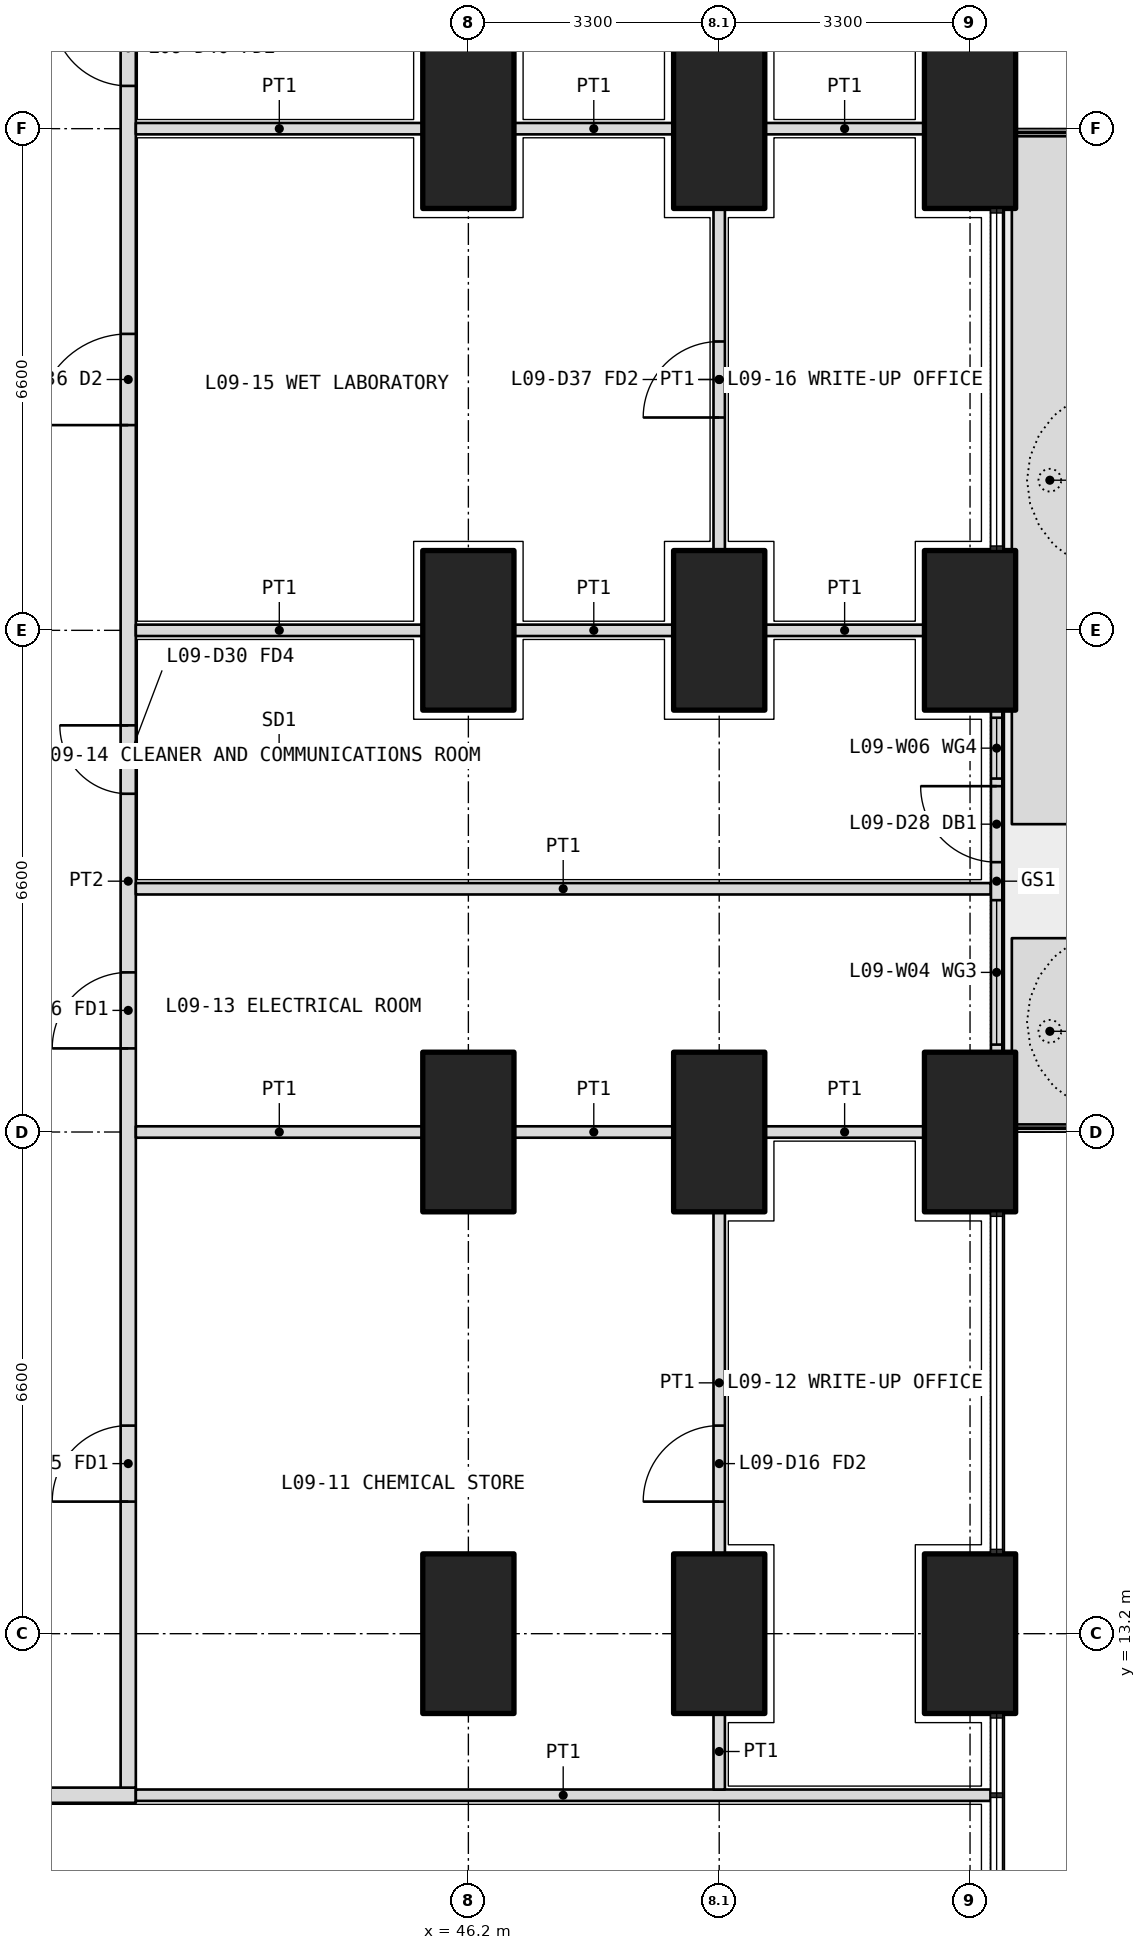
"""IFC4 building model, lengths in metres.
Left out: names, types, materials, properties, quantities, classifications, styles, units other than length and angle.
Written with IfcOpenShell. Run it as: python <this file> out.ifc"""

import sys

from ifc_helpers import new_model, si_unit, direction, frame, frame_2d, origin, origin_2d, place, context, subcontext, project, spatial, polyline, rectangle, outline, extrude, element, fill, save


model = new_model("IFC4")
c1 = context("Model", 3, precision=1e-05, world=origin(), true_north=direction((0.0, 1.0)))
c2 = subcontext(c1, "Body", "Model", "MODEL_VIEW")
j1 = project(units=[si_unit("LENGTHUNIT", "METRE"), si_unit("PLANEANGLEUNIT", "RADIAN")], contexts=[c1])
p1 = place(None, origin())
s1 = spatial("IfcSite", under=j1, at=p1, CompositionType="ELEMENT")
p2 = place(p1, origin())
s2 = spatial("IfcBuilding", under=s1, at=p2, CompositionType="ELEMENT")
p3 = place(p2, frame((0.0, 0.0, 42.3)))
s3 = spatial("IfcBuildingStorey", under=s2, at=p3, CompositionType="ELEMENT", Elevation=42.3)
for number, where, z_axis, x_axis in (
    (1, (52.8, 13.2, 0.0), (0.0, 0.0, 1.0), (0.0, 1.0, 0.0)),
    (2, (52.8, 19.8, 0.0), (0.0, 0.0, 1.0), (0.0, 1.0, 0.0)),
    (3, (52.8, 26.4, 0.0), (0.0, 0.0, 1.0), (0.0, 1.0, 0.0)),
    (4, (52.8, 33.0, 0.0), (0.0, 0.0, 1.0), (0.0, 1.0, 0.0)),
    (5, (49.5, 13.2, 0.0), (0.0, 0.0, 1.0), (0.0, 1.0, 0.0)),
    (6, (49.5, 19.8, 0.0), (0.0, 0.0, 1.0), (0.0, 1.0, 0.0)),
    (7, (49.5, 26.4, 0.0), (0.0, 0.0, 1.0), (0.0, 1.0, 0.0)),
    (8, (49.5, 33.0, 0.0), (0.0, 0.0, 1.0), (0.0, 1.0, 0.0)),
    (9, (46.2, 13.2, 0.0), (0.0, 0.0, 1.0), (0.0, 1.0, 0.0)),
    (10, (46.2, 19.8, 0.0), (0.0, 0.0, 1.0), (0.0, 1.0, 0.0)),
    (11, (46.2, 26.4, 0.0), (0.0, 0.0, 1.0), (0.0, 1.0, 0.0)),
    (12, (46.2, 33.0, 0.0), (0.0, 0.0, 1.0), (0.0, 1.0, 0.0)),
):
    element("IfcColumn", number, at=place(p3, frame(where, z_axis=z_axis, x_axis=x_axis)), inside=s3, PredefinedType="COLUMN", context=c2, shape_type="SweptSolid", body=[
        extrude(rectangle(XDim=2.1, YDim=1.2, at=origin_2d()), origin(), (0.0, 0.0, 1.0), 4.2),
    ])
p4 = place(p3, origin())
e13 = element("IfcWall", 13, at=p4, inside=s3, PredefinedType="USERDEFINED", context=c2, shape_type="SweptSolid", body=[
    extrude(outline(polyline([(53.35, 19.9), (54.35, 19.9), (54.35, 22.35), (53.35, 22.35), (53.35, 19.9)]), holes=[polyline([(53.5, 20.05), (54.2, 20.05), (54.2, 22.2), (53.5, 22.2), (53.5, 20.05)])]), origin(), (0.0, 0.0, 1.0), 1.05),
])
p5 = place(p3, origin())
e14 = element("IfcWall", 14, at=p5, inside=s3, PredefinedType="USERDEFINED", context=c2, shape_type="SweptSolid", body=[
    extrude(outline(polyline([(53.35, 23.85), (54.35, 23.85), (54.35, 32.9), (53.35, 32.9), (53.35, 23.85)]), holes=[polyline([(53.5, 24.0), (54.2, 24.0), (54.2, 32.75), (53.5, 32.75), (53.5, 24.0)])]), origin(), (0.0, 0.0, 1.0), 1.05),
])
p6 = place(p3, frame((53.15, 20.85, 0.0), z_axis=(0.0, 0.0, 1.0), x_axis=(0.0, 1.0, 0.0)))
e15 = element("IfcWall", 15, at=p6, inside=s3, PredefinedType="SOLIDWALL", context=c2, shape_type="SweptSolid", body=[
    extrude(rectangle(XDim=4.5, YDim=0.15, at=frame_2d((2.25, 0.0))), origin(), (0.0, 0.0, 1.0), 2.7),
])
p7 = place(p6, frame((2.5, 0.0, 0.0)))
e16 = element("IfcOpeningElement", 16, at=p7, cuts=e15, PredefinedType="OPENING", context=c2, shape_type="SweptSolid", body=[
    extrude(rectangle(XDim=1.0, YDim=2.4, at=frame_2d((0.5, 1.2))), frame((0.0, 0.085, 0.0), z_axis=(0.0, -1.0, 0.0), x_axis=(1.0, 0.0, 0.0)), (0.0, 0.0, 1.0), 0.17),
])
p8 = place(p6, frame((0.1, 0.0, 0.1)))
e17 = element("IfcOpeningElement", 17, at=p8, cuts=e15, PredefinedType="OPENING", context=c2, shape_type="SweptSolid", body=[
    extrude(rectangle(XDim=1.9, YDim=2.3, at=frame_2d((0.95, 1.15))), frame((0.0, 0.085, 0.0), z_axis=(0.0, -1.0, 0.0), x_axis=(1.0, 0.0, 0.0)), (0.0, 0.0, 1.0), 0.17),
])
p9 = place(p6, frame((3.6, 0.0, 0.1)))
e18 = element("IfcOpeningElement", 18, at=p9, cuts=e15, PredefinedType="OPENING", context=c2, shape_type="SweptSolid", body=[
    extrude(rectangle(XDim=0.8, YDim=2.3, at=frame_2d((0.4, 1.15))), frame((0.0, 0.085, 0.0), z_axis=(0.0, -1.0, 0.0), x_axis=(1.0, 0.0, 0.0)), (0.0, 0.0, 1.0), 0.17),
])
p10 = place(p3, frame((10.975, 11.075, 0.0), z_axis=(0.0, 0.0, 1.0), x_axis=(1.0, 0.0, 0.0)))
e19 = element("IfcWall", 19, at=p10, inside=s3, PredefinedType="PARTITIONING", context=c2, shape_type="SweptSolid", body=[
    extrude(rectangle(XDim=30.85, YDim=0.2, at=frame_2d((15.425, 0.0))), origin(), (0.0, 0.0, 1.0), 2.85),
])
p11 = place(p10, frame((2.312, 0.0, 0.0)))
e20 = element("IfcOpeningElement", 20, at=p11, cuts=e19, PredefinedType="OPENING", context=c2, shape_type="SweptSolid", body=[
    extrude(rectangle(XDim=1.0, YDim=2.1, at=frame_2d((0.5, 1.05))), frame((0.0, 0.11, 0.0), z_axis=(0.0, -1.0, 0.0), x_axis=(1.0, 0.0, 0.0)), (0.0, 0.0, 1.0), 0.22),
])
p12 = place(p10, frame((6.575, 0.0, 0.0)))
e21 = element("IfcOpeningElement", 21, at=p12, cuts=e19, PredefinedType="OPENING", context=c2, shape_type="SweptSolid", body=[
    extrude(rectangle(XDim=1.2, YDim=2.1, at=frame_2d((0.6, 1.05))), frame((0.0, 0.11, 0.0), z_axis=(0.0, -1.0, 0.0), x_axis=(1.0, 0.0, 0.0)), (0.0, 0.0, 1.0), 0.22),
])
p13 = place(p10, frame((13.275, 0.0, 0.0)))
e22 = element("IfcOpeningElement", 22, at=p13, cuts=e19, PredefinedType="OPENING", context=c2, shape_type="SweptSolid", body=[
    extrude(rectangle(XDim=1.0, YDim=2.1, at=frame_2d((0.5, 1.05))), frame((0.0, 0.11, 0.0), z_axis=(0.0, -1.0, 0.0), x_axis=(1.0, 0.0, 0.0)), (0.0, 0.0, 1.0), 0.22),
])
p14 = place(p10, frame((20.325, 0.0, 0.0)))
e23 = element("IfcOpeningElement", 23, at=p14, cuts=e19, PredefinedType="OPENING", context=c2, shape_type="SweptSolid", body=[
    extrude(rectangle(XDim=1.0, YDim=2.1, at=frame_2d((0.5, 1.05))), frame((0.0, 0.11, 0.0), z_axis=(0.0, -1.0, 0.0), x_axis=(1.0, 0.0, 0.0)), (0.0, 0.0, 1.0), 0.22),
])
p15 = place(p10, frame((23.625, 0.0, 0.0)))
e24 = element("IfcOpeningElement", 24, at=p15, cuts=e19, PredefinedType="OPENING", context=c2, shape_type="SweptSolid", body=[
    extrude(rectangle(XDim=1.0, YDim=2.1, at=frame_2d((0.5, 1.05))), frame((0.0, 0.11, 0.0), z_axis=(0.0, -1.0, 0.0), x_axis=(1.0, 0.0, 0.0)), (0.0, 0.0, 1.0), 0.22),
])
p16 = place(p10, frame((27.438, 0.0, 0.0)))
e25 = element("IfcOpeningElement", 25, at=p16, cuts=e19, PredefinedType="OPENING", context=c2, shape_type="SweptSolid", body=[
    extrude(rectangle(XDim=1.2, YDim=2.1, at=frame_2d((0.6, 1.05))), frame((0.0, 0.11, 0.0), z_axis=(0.0, -1.0, 0.0), x_axis=(1.0, 0.0, 0.0)), (0.0, 0.0, 1.0), 0.22),
])
p17 = place(p3, frame((41.725, 11.175, 0.0), z_axis=(0.0, 0.0, 1.0), x_axis=(0.0, 1.0, 0.0)))
e26 = element("IfcWall", 26, at=p17, inside=s3, PredefinedType="PARTITIONING", context=c2, shape_type="SweptSolid", body=[
    extrude(rectangle(XDim=23.85, YDim=0.2, at=frame_2d((11.925, 0.0))), origin(), (0.0, 0.0, 1.0), 2.85),
])
p18 = place(p17, frame((3.762, 0.0, 0.0)))
e27 = element("IfcOpeningElement", 27, at=p18, cuts=e26, PredefinedType="OPENING", context=c2, shape_type="SweptSolid", body=[
    extrude(rectangle(XDim=1.0, YDim=2.1, at=frame_2d((0.5, 1.05))), frame((0.0, 0.11, 0.0), z_axis=(0.0, -1.0, 0.0), x_axis=(1.0, 0.0, 0.0)), (0.0, 0.0, 1.0), 0.22),
])
p19 = place(p17, frame((9.725, 0.0, 0.0)))
e28 = element("IfcOpeningElement", 28, at=p19, cuts=e26, PredefinedType="OPENING", context=c2, shape_type="SweptSolid", body=[
    extrude(rectangle(XDim=1.0, YDim=2.1, at=frame_2d((0.5, 1.05))), frame((0.0, 0.11, 0.0), z_axis=(0.0, -1.0, 0.0), x_axis=(1.0, 0.0, 0.0)), (0.0, 0.0, 1.0), 0.22),
])
p20 = place(p17, frame((13.075, 0.0, 0.0)))
e29 = element("IfcOpeningElement", 29, at=p20, cuts=e26, PredefinedType="OPENING", context=c2, shape_type="SweptSolid", body=[
    extrude(rectangle(XDim=0.9, YDim=2.1, at=frame_2d((0.45, 1.05))), frame((0.0, 0.11, 0.0), z_axis=(0.0, -1.0, 0.0), x_axis=(1.0, 0.0, 0.0)), (0.0, 0.0, 1.0), 0.22),
])
p21 = place(p17, frame((17.925, 0.0, 0.0)))
e30 = element("IfcOpeningElement", 30, at=p21, cuts=e26, PredefinedType="OPENING", context=c2, shape_type="SweptSolid", body=[
    extrude(rectangle(XDim=1.2, YDim=2.1, at=frame_2d((0.6, 1.05))), frame((0.0, 0.11, 0.0), z_axis=(0.0, -1.0, 0.0), x_axis=(1.0, 0.0, 0.0)), (0.0, 0.0, 1.0), 0.22),
])
p22 = place(p17, frame((22.387, 0.0, 0.0)))
e31 = element("IfcOpeningElement", 31, at=p22, cuts=e26, PredefinedType="OPENING", context=c2, shape_type="SweptSolid", body=[
    extrude(rectangle(XDim=1.0, YDim=2.1, at=frame_2d((0.5, 1.05))), frame((0.0, 0.11, 0.0), z_axis=(0.0, -1.0, 0.0), x_axis=(1.0, 0.0, 0.0)), (0.0, 0.0, 1.0), 0.22),
])
p23 = place(p3, frame((53.07, 11.075, 0.0), z_axis=(0.0, 0.0, 1.0), x_axis=(-1.0, 0.0, 0.0)))
e32 = element("IfcWall", 32, at=p23, inside=s3, PredefinedType="PARTITIONING", context=c2, shape_type="SweptSolid", body=[
    extrude(rectangle(XDim=11.245, YDim=0.15, at=frame_2d((5.623, 0.0))), origin(), (0.0, 0.0, 1.0), 2.7),
])
p24 = place(p3, frame((49.5, 11.15, 0.0), z_axis=(0.0, 0.0, 1.0), x_axis=(0.0, 1.0, 0.0)))
e33 = element("IfcWall", 33, at=p24, inside=s3, PredefinedType="PARTITIONING", context=c2, shape_type="SweptSolid", body=[
    extrude(rectangle(XDim=1.0, YDim=0.15, at=frame_2d((0.5, 0.0))), origin(), (0.0, 0.0, 1.0), 3.9),
])
p25 = place(p3, frame((49.5, 14.25, 0.0), z_axis=(0.0, 0.0, 1.0), x_axis=(0.0, 1.0, 0.0)))
e34 = element("IfcWall", 34, at=p25, inside=s3, PredefinedType="PARTITIONING", context=c2, shape_type="SweptSolid", body=[
    extrude(rectangle(XDim=4.5, YDim=0.15, at=frame_2d((2.25, 0.0))), origin(), (0.0, 0.0, 1.0), 3.9),
])
p26 = place(p25, frame((0.688, 0.0, 0.0)))
e35 = element("IfcOpeningElement", 35, at=p26, cuts=e34, PredefinedType="OPENING", context=c2, shape_type="SweptSolid", body=[
    extrude(rectangle(XDim=1.0, YDim=2.1, at=frame_2d((0.5, 1.05))), frame((0.0, 0.085, 0.0), z_axis=(0.0, -1.0, 0.0), x_axis=(1.0, 0.0, 0.0)), (0.0, 0.0, 1.0), 0.17),
])
p27 = place(p3, frame((49.5, 27.45, 0.0), z_axis=(0.0, 0.0, 1.0), x_axis=(0.0, 1.0, 0.0)))
e36 = element("IfcWall", 36, at=p27, inside=s3, PredefinedType="PARTITIONING", context=c2, shape_type="SweptSolid", body=[
    extrude(rectangle(XDim=4.5, YDim=0.15, at=frame_2d((2.25, 0.0))), origin(), (0.0, 0.0, 1.0), 3.9),
])
p28 = place(p27, frame((1.75, 0.0, 0.0)))
e37 = element("IfcOpeningElement", 37, at=p28, cuts=e36, PredefinedType="OPENING", context=c2, shape_type="SweptSolid", body=[
    extrude(rectangle(XDim=1.0, YDim=2.1, at=frame_2d((0.5, 1.05))), frame((0.0, 0.085, 0.0), z_axis=(0.0, -1.0, 0.0), x_axis=(1.0, 0.0, 0.0)), (0.0, 0.0, 1.0), 0.17),
])
p29 = place(p3, frame((53.07, 23.0, 0.0), z_axis=(0.0, 0.0, 1.0), x_axis=(-1.0, 0.0, 0.0)))
e38 = element("IfcWall", 38, at=p29, inside=s3, PredefinedType="PARTITIONING", context=c2, shape_type="SweptSolid", body=[
    extrude(rectangle(XDim=11.245, YDim=0.15, at=frame_2d((5.623, 0.0))), origin(), (0.0, 0.0, 1.0), 2.7),
])
for number, where, z_axis, x_axis in (
    (39, (52.2, 26.4, 0.0), (0.0, 0.0, 1.0), (-1.0, 0.0, 0.0)),
    (40, (48.9, 26.4, 0.0), (0.0, 0.0, 1.0), (-1.0, 0.0, 0.0)),
):
    element("IfcWall", number, at=place(p3, frame(where, z_axis=z_axis, x_axis=x_axis)), inside=s3, PredefinedType="PARTITIONING", context=c2, shape_type="SweptSolid", body=[
        extrude(rectangle(XDim=2.1, YDim=0.15, at=frame_2d((1.05, 0.0))), origin(), (0.0, 0.0, 1.0), 2.85),
    ])
p30 = place(p3, frame((45.6, 26.4, 0.0), z_axis=(0.0, 0.0, 1.0), x_axis=(-1.0, 0.0, 0.0)))
e41 = element("IfcWall", 41, at=p30, inside=s3, PredefinedType="PARTITIONING", context=c2, shape_type="SweptSolid", body=[
    extrude(rectangle(XDim=3.775, YDim=0.15, at=frame_2d((1.888, 0.0))), origin(), (0.0, 0.0, 1.0), 2.85),
])
for number, where, z_axis, x_axis in (
    (42, (52.2, 19.8, 0.0), (0.0, 0.0, 1.0), (-1.0, 0.0, 0.0)),
    (43, (48.9, 19.8, 0.0), (0.0, 0.0, 1.0), (-1.0, 0.0, 0.0)),
):
    element("IfcWall", number, at=place(p3, frame(where, z_axis=z_axis, x_axis=x_axis)), inside=s3, PredefinedType="PARTITIONING", context=c2, shape_type="SweptSolid", body=[
        extrude(rectangle(XDim=2.1, YDim=0.15, at=frame_2d((1.05, 0.0))), origin(), (0.0, 0.0, 1.0), 2.85),
    ])
p31 = place(p3, frame((45.6, 19.8, 0.0), z_axis=(0.0, 0.0, 1.0), x_axis=(-1.0, 0.0, 0.0)))
e44 = element("IfcWall", 44, at=p31, inside=s3, PredefinedType="PARTITIONING", context=c2, shape_type="SweptSolid", body=[
    extrude(rectangle(XDim=3.775, YDim=0.15, at=frame_2d((1.888, 0.0))), origin(), (0.0, 0.0, 1.0), 2.85),
])
for number, where, z_axis, x_axis in (
    (45, (52.2, 33.0, 0.0), (0.0, 0.0, 1.0), (-1.0, 0.0, 0.0)),
    (46, (48.9, 33.0, 0.0), (0.0, 0.0, 1.0), (-1.0, 0.0, 0.0)),
):
    element("IfcWall", number, at=place(p3, frame(where, z_axis=z_axis, x_axis=x_axis)), inside=s3, PredefinedType="PARTITIONING", context=c2, shape_type="SweptSolid", body=[
        extrude(rectangle(XDim=2.1, YDim=0.15, at=frame_2d((1.05, 0.0))), origin(), (0.0, 0.0, 1.0), 2.85),
    ])
p32 = place(p3, frame((45.6, 33.0, 0.0), z_axis=(0.0, 0.0, 1.0), x_axis=(-1.0, 0.0, 0.0)))
e47 = element("IfcWall", 47, at=p32, inside=s3, PredefinedType="PARTITIONING", context=c2, shape_type="SweptSolid", body=[
    extrude(rectangle(XDim=3.775, YDim=0.15, at=frame_2d((1.888, 0.0))), origin(), (0.0, 0.0, 1.0), 2.85),
])
p33 = place(p7, origin())
e48 = element("IfcDoor", 48, at=p33, inside=s3, OperationType="SINGLE_SWING_RIGHT", PredefinedType="DOOR", context=c2, shape_type="SweptSolid", body=[
    extrude(rectangle(XDim=1.0, YDim=2.4, at=frame_2d((0.5, 1.2))), frame((0.0, 0.025, 0.0), z_axis=(0.0, -1.0, 0.0), x_axis=(1.0, 0.0, 0.0)), (0.0, 0.0, 1.0), 0.05),
])
fill(e16, e48)
p34 = place(p8, origin())
e49 = element("IfcWindow", 49, at=p34, inside=s3, PartitioningType="SINGLE_PANEL", PredefinedType="WINDOW", context=c2, shape_type="SweptSolid", body=[
    extrude(rectangle(XDim=1.9, YDim=2.3, at=frame_2d((0.95, 1.15))), frame((0.0, 0.03, 0.0), z_axis=(0.0, -1.0, 0.0), x_axis=(1.0, 0.0, 0.0)), (0.0, 0.0, 1.0), 0.06),
])
fill(e17, e49)
p35 = place(p9, origin())
e50 = element("IfcWindow", 50, at=p35, inside=s3, PartitioningType="SINGLE_PANEL", PredefinedType="WINDOW", context=c2, shape_type="SweptSolid", body=[
    extrude(rectangle(XDim=0.8, YDim=2.3, at=frame_2d((0.4, 1.15))), frame((0.0, 0.03, 0.0), z_axis=(0.0, -1.0, 0.0), x_axis=(1.0, 0.0, 0.0)), (0.0, 0.0, 1.0), 0.06),
])
fill(e18, e50)
p36 = place(p18, origin())
e51 = element("IfcDoor", 51, at=p36, inside=s3, OperationType="SINGLE_SWING_LEFT", PredefinedType="DOOR", context=c2, shape_type="SweptSolid", body=[
    extrude(rectangle(XDim=1.0, YDim=2.1, at=frame_2d((0.5, 1.05))), frame((0.0, 0.025, 0.0), z_axis=(0.0, -1.0, 0.0), x_axis=(1.0, 0.0, 0.0)), (0.0, 0.0, 1.0), 0.05),
])
fill(e27, e51)
p37 = place(p26, origin())
e52 = element("IfcDoor", 52, at=p37, inside=s3, OperationType="SINGLE_SWING_LEFT", PredefinedType="DOOR", context=c2, shape_type="SweptSolid", body=[
    extrude(rectangle(XDim=1.0, YDim=2.1, at=frame_2d((0.5, 1.05))), frame((0.0, 0.025, 0.0), z_axis=(0.0, -1.0, 0.0), x_axis=(1.0, 0.0, 0.0)), (0.0, 0.0, 1.0), 0.05),
])
fill(e35, e52)
p38 = place(p19, origin())
e53 = element("IfcDoor", 53, at=p38, inside=s3, OperationType="SINGLE_SWING_LEFT", PredefinedType="DOOR", context=c2, shape_type="SweptSolid", body=[
    extrude(rectangle(XDim=1.0, YDim=2.1, at=frame_2d((0.5, 1.05))), frame((0.0, 0.025, 0.0), z_axis=(0.0, -1.0, 0.0), x_axis=(1.0, 0.0, 0.0)), (0.0, 0.0, 1.0), 0.05),
])
fill(e28, e53)
p39 = place(p20, origin())
e54 = element("IfcDoor", 54, at=p39, inside=s3, OperationType="SINGLE_SWING_RIGHT", PredefinedType="DOOR", context=c2, shape_type="SweptSolid", body=[
    extrude(rectangle(XDim=0.9, YDim=2.1, at=frame_2d((0.45, 1.05))), frame((0.0, 0.025, 0.0), z_axis=(0.0, -1.0, 0.0), x_axis=(1.0, 0.0, 0.0)), (0.0, 0.0, 1.0), 0.05),
])
fill(e29, e54)
p40 = place(p21, origin())
e55 = element("IfcDoor", 55, at=p40, inside=s3, OperationType="DOUBLE_DOOR_SINGLE_SWING", PredefinedType="DOOR", context=c2, shape_type="SweptSolid", body=[
    extrude(rectangle(XDim=1.2, YDim=2.1, at=frame_2d((0.6, 1.05))), frame((0.0, 0.025, 0.0), z_axis=(0.0, -1.0, 0.0), x_axis=(1.0, 0.0, 0.0)), (0.0, 0.0, 1.0), 0.05),
])
fill(e30, e55)
p41 = place(p28, origin())
e56 = element("IfcDoor", 56, at=p41, inside=s3, OperationType="SINGLE_SWING_LEFT", PredefinedType="DOOR", context=c2, shape_type="SweptSolid", body=[
    extrude(rectangle(XDim=1.0, YDim=2.1, at=frame_2d((0.5, 1.05))), frame((0.0, 0.025, 0.0), z_axis=(0.0, -1.0, 0.0), x_axis=(1.0, 0.0, 0.0)), (0.0, 0.0, 1.0), 0.05),
])
fill(e37, e56)
p42 = place(p22, origin())
e57 = element("IfcDoor", 57, at=p42, inside=s3, OperationType="SINGLE_SWING_RIGHT", PredefinedType="DOOR", context=c2, shape_type="SweptSolid", body=[
    extrude(rectangle(XDim=1.0, YDim=2.1, at=frame_2d((0.5, 1.05))), frame((0.0, 0.025, 0.0), z_axis=(0.0, -1.0, 0.0), x_axis=(1.0, 0.0, 0.0)), (0.0, 0.0, 1.0), 0.05),
])
fill(e31, e57)
save(model, sys.argv[1])
